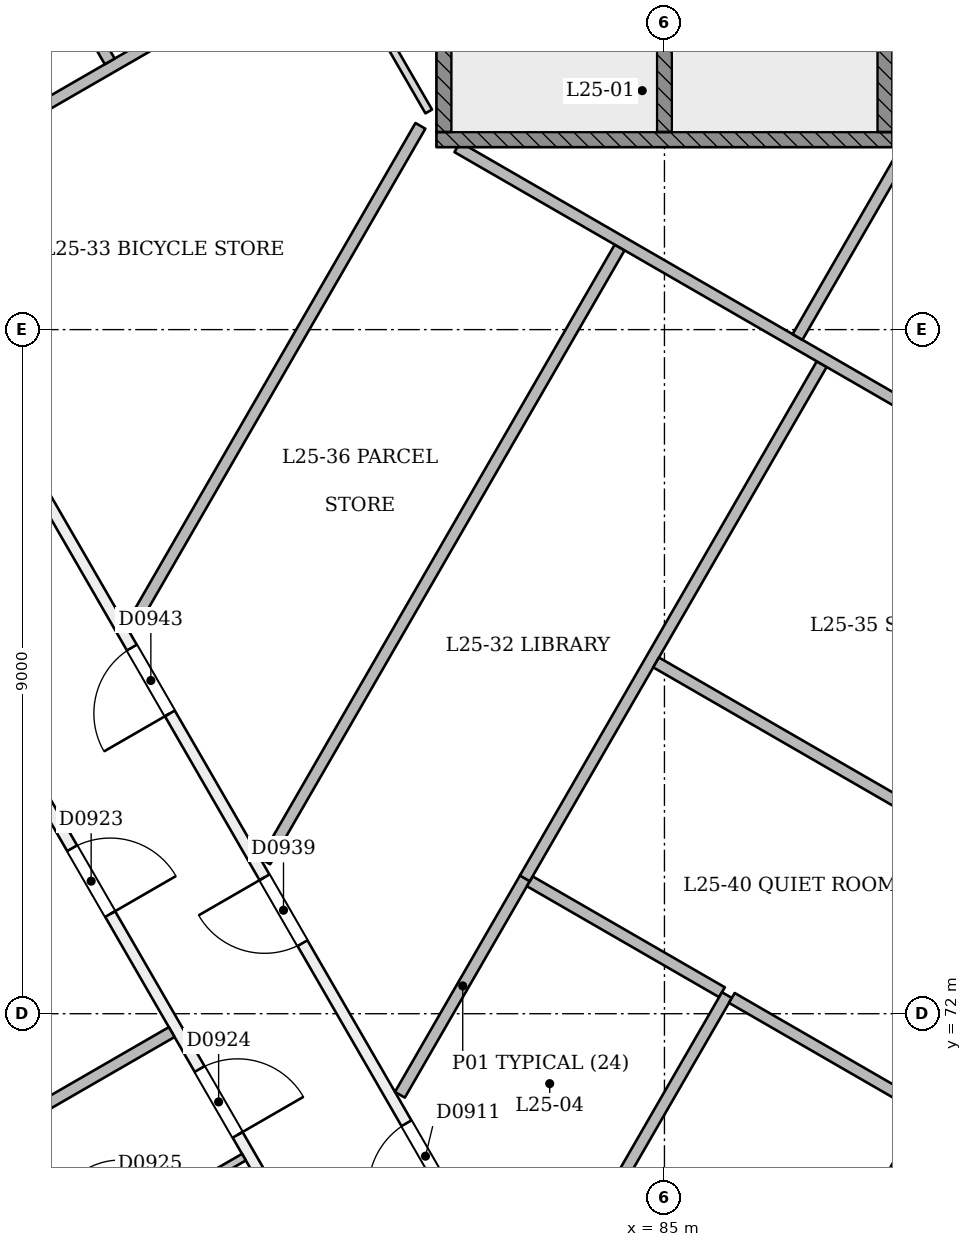
"""IFC4 building model, lengths in metres.
Left out: names, types, materials, properties, quantities, classifications, styles, units other than length and angle.
Written with IfcOpenShell. Run it as: python <this file> out.ifc"""

import sys

from ifc_helpers import new_model, si_unit, direction, frame, frame_2d, origin, place, context, subcontext, project, spatial, rectangle, extrude, element, fill, save


model = new_model("IFC4")
c1 = context("Model", 3, precision=1e-05, world=origin(), true_north=direction((0.0, 1.0)))
c2 = subcontext(c1, "Body", "Model", "MODEL_VIEW")
j1 = project(units=[si_unit("LENGTHUNIT", "METRE"), si_unit("PLANEANGLEUNIT", "RADIAN")], contexts=[c1])
p1 = place(None, origin())
s1 = spatial("IfcSite", under=j1, at=p1, CompositionType="ELEMENT")
p2 = place(p1, origin())
s2 = spatial("IfcBuilding", under=s1, at=p2, CompositionType="ELEMENT")
p3 = place(p2, frame((0.0, 0.0, 100.8)))
s3 = spatial("IfcBuildingStorey", under=s2, at=p3, CompositionType="ELEMENT", Elevation=100.8)
p4 = place(p3, frame((84.935, 64.793, 0.0), z_axis=(0.0, 0.0, 1.0), x_axis=(-0.500000245635, 0.866025261967, 0.0)))
e1 = element("IfcWall", 1, at=p4, inside=s3, PredefinedType="PARTITIONING", context=c2, shape_type="SweptSolid", body=[
    extrude(rectangle(XDim=29.568, YDim=0.15, at=frame_2d((14.784, 0.0))), origin(), (0.0, 0.0, 1.0), 3.1),
])
p5 = place(p4, frame((26.417, 0.0, 0.0)))
e2 = element("IfcOpeningElement", 2, at=p5, cuts=e1, PredefinedType="OPENING", context=c2, shape_type="SweptSolid", body=[
    extrude(rectangle(XDim=0.9, YDim=2.1, at=frame_2d((0.45, 1.05))), frame((0.0, 0.085, 0.0), z_axis=(0.0, -1.0, 0.0), x_axis=(1.0, 0.0, 0.0)), (0.0, 0.0, 1.0), 0.171),
])
p6 = place(p4, frame((5.658, 0.0, 0.0)))
e3 = element("IfcOpeningElement", 3, at=p6, cuts=e1, PredefinedType="OPENING", context=c2, shape_type="SweptSolid", body=[
    extrude(rectangle(XDim=1.0, YDim=2.1, at=frame_2d((0.5, 1.05))), frame((0.0, 0.085, 0.0), z_axis=(0.0, -1.0, 0.0), x_axis=(1.0, 0.0, 0.0)), (0.0, 0.0, 1.0), 0.171),
])
p7 = place(p4, frame((9.394, 0.0, 0.0)))
e4 = element("IfcOpeningElement", 4, at=p7, cuts=e1, PredefinedType="OPENING", context=c2, shape_type="SweptSolid", body=[
    extrude(rectangle(XDim=1.0, YDim=2.1, at=frame_2d((0.5, 1.05))), frame((0.0, 0.085, 0.0), z_axis=(0.0, -1.0, 0.0), x_axis=(1.0, 0.0, 0.0)), (0.0, 0.0, 1.0), 0.171),
])
p8 = place(p4, frame((17.694, 0.0, 0.0)))
e5 = element("IfcOpeningElement", 5, at=p8, cuts=e1, PredefinedType="OPENING", context=c2, shape_type="SweptSolid", body=[
    extrude(rectangle(XDim=1.0, YDim=2.1, at=frame_2d((0.5, 1.05))), frame((0.0, 0.085, 0.0), z_axis=(0.0, -1.0, 0.0), x_axis=(1.0, 0.0, 0.0)), (0.0, 0.0, 1.0), 0.171),
])
p9 = place(p4, frame((12.884, 0.0, 0.0)))
e6 = element("IfcOpeningElement", 6, at=p9, cuts=e1, PredefinedType="OPENING", context=c2, shape_type="SweptSolid", body=[
    extrude(rectangle(XDim=1.0, YDim=2.1, at=frame_2d((0.5, 1.05))), frame((0.0, 0.085, 0.0), z_axis=(0.0, -1.0, 0.0), x_axis=(1.0, 0.0, 0.0)), (0.0, 0.0, 1.0), 0.171),
])
p10 = place(p4, frame((22.366, 0.0, 0.0)))
e7 = element("IfcOpeningElement", 7, at=p10, cuts=e1, PredefinedType="OPENING", context=c2, shape_type="SweptSolid", body=[
    extrude(rectangle(XDim=1.0, YDim=2.1, at=frame_2d((0.5, 1.05))), frame((0.0, 0.085, 0.0), z_axis=(0.0, -1.0, 0.0), x_axis=(1.0, 0.0, 0.0)), (0.0, 0.0, 1.0), 0.171),
])
p11 = place(p3, frame((63.623, 97.706, 0.0), z_axis=(0.0, 0.0, 1.0), x_axis=(0.500000781663, -0.866024952491, 0.0)))
e8 = element("IfcWall", 8, at=p11, inside=s3, PredefinedType="PARTITIONING", context=c2, shape_type="SweptSolid", body=[
    extrude(rectangle(XDim=41.837, YDim=0.15, at=frame_2d((20.919, 0.0))), origin(), (0.0, 0.0, 1.0), 2.7),
])
p12 = place(p11, frame((2.912, 0.0, 0.0)))
e9 = element("IfcOpeningElement", 9, at=p12, cuts=e8, PredefinedType="OPENING", context=c2, shape_type="SweptSolid", body=[
    extrude(rectangle(XDim=1.2, YDim=2.1, at=frame_2d((0.6, 1.05))), frame((0.0, 0.085, 0.0), z_axis=(0.0, -1.0, 0.0), x_axis=(1.0, 0.0, 0.0)), (0.0, 0.0, 1.0), 0.171),
])
p13 = place(p11, frame((10.198, 0.0, 0.0)))
e10 = element("IfcOpeningElement", 10, at=p13, cuts=e8, PredefinedType="OPENING", context=c2, shape_type="SweptSolid", body=[
    extrude(rectangle(XDim=1.0, YDim=2.1, at=frame_2d((0.5, 1.05))), frame((0.0, 0.085, 0.0), z_axis=(0.0, -1.0, 0.0), x_axis=(1.0, 0.0, 0.0)), (0.0, 0.0, 1.0), 0.171),
])
p14 = place(p11, frame((12.523, 0.0, 0.0)))
e11 = element("IfcOpeningElement", 11, at=p14, cuts=e8, PredefinedType="OPENING", context=c2, shape_type="SweptSolid", body=[
    extrude(rectangle(XDim=1.0, YDim=2.1, at=frame_2d((0.5, 1.05))), frame((0.0, 0.085, 0.0), z_axis=(0.0, -1.0, 0.0), x_axis=(1.0, 0.0, 0.0)), (0.0, 0.0, 1.0), 0.171),
])
p15 = place(p11, frame((19.314, 0.0, 0.0)))
e12 = element("IfcOpeningElement", 12, at=p15, cuts=e8, PredefinedType="OPENING", context=c2, shape_type="SweptSolid", body=[
    extrude(rectangle(XDim=1.0, YDim=2.1, at=frame_2d((0.5, 1.05))), frame((0.0, 0.085, 0.0), z_axis=(0.0, -1.0, 0.0), x_axis=(1.0, 0.0, 0.0)), (0.0, 0.0, 1.0), 0.171),
])
p16 = place(p11, frame((21.639, 0.0, 0.0)))
e13 = element("IfcOpeningElement", 13, at=p16, cuts=e8, PredefinedType="OPENING", context=c2, shape_type="SweptSolid", body=[
    extrude(rectangle(XDim=1.0, YDim=2.1, at=frame_2d((0.5, 1.05))), frame((0.0, 0.085, 0.0), z_axis=(0.0, -1.0, 0.0), x_axis=(1.0, 0.0, 0.0)), (0.0, 0.0, 1.0), 0.171),
])
p17 = place(p11, frame((27.169, 0.0, 0.0)))
e14 = element("IfcOpeningElement", 14, at=p17, cuts=e8, PredefinedType="OPENING", context=c2, shape_type="SweptSolid", body=[
    extrude(rectangle(XDim=1.0, YDim=2.1, at=frame_2d((0.5, 1.05))), frame((0.0, 0.085, 0.0), z_axis=(0.0, -1.0, 0.0), x_axis=(1.0, 0.0, 0.0)), (0.0, 0.0, 1.0), 0.171),
])
p18 = place(p11, frame((30.523, 0.0, 0.0)))
e15 = element("IfcOpeningElement", 15, at=p18, cuts=e8, PredefinedType="OPENING", context=c2, shape_type="SweptSolid", body=[
    extrude(rectangle(XDim=1.0, YDim=2.1, at=frame_2d((0.5, 1.05))), frame((0.0, 0.085, 0.0), z_axis=(0.0, -1.0, 0.0), x_axis=(1.0, 0.0, 0.0)), (0.0, 0.0, 1.0), 0.171),
])
p19 = place(p11, frame((37.725, 0.0, 0.0)))
e16 = element("IfcOpeningElement", 16, at=p19, cuts=e8, PredefinedType="OPENING", context=c2, shape_type="SweptSolid", body=[
    extrude(rectangle(XDim=1.2, YDim=2.1, at=frame_2d((0.6, 1.05))), frame((0.0, 0.085, 0.0), z_axis=(0.0, -1.0, 0.0), x_axis=(1.0, 0.0, 0.0)), (0.0, 0.0, 1.0), 0.171),
])
p20 = place(p3, frame((85.458, 61.474, 0.0), z_axis=(0.0, 0.0, 1.0), x_axis=(0.500000781663, 0.866024952491, 0.0)))
e17 = element("IfcWall", 17, at=p20, inside=s3, PredefinedType="PARTITIONING", context=c2, shape_type="SweptSolid", body=[
    extrude(rectangle(XDim=41.837, YDim=0.15, at=frame_2d((20.919, 0.0))), origin(), (0.0, 0.0, 1.0), 2.7),
])
p21 = place(p20, frame((0.253, 0.0, 0.0)))
e18 = element("IfcOpeningElement", 18, at=p21, cuts=e17, PredefinedType="OPENING", context=c2, shape_type="SweptSolid", body=[
    extrude(rectangle(XDim=1.2, YDim=2.1, at=frame_2d((0.6, 1.05))), frame((0.0, 0.085, 0.0), z_axis=(0.0, -1.0, 0.0), x_axis=(1.0, 0.0, 0.0)), (0.0, 0.0, 1.0), 0.171),
])
p22 = place(p20, frame((5.719, 0.0, 0.0)))
e19 = element("IfcOpeningElement", 19, at=p22, cuts=e17, PredefinedType="OPENING", context=c2, shape_type="SweptSolid", body=[
    extrude(rectangle(XDim=1.2, YDim=2.1, at=frame_2d((0.6, 1.05))), frame((0.0, 0.085, 0.0), z_axis=(0.0, -1.0, 0.0), x_axis=(1.0, 0.0, 0.0)), (0.0, 0.0, 1.0), 0.171),
])
p23 = place(p20, frame((13.669, 0.0, 0.0)))
e20 = element("IfcOpeningElement", 20, at=p23, cuts=e17, PredefinedType="OPENING", context=c2, shape_type="SweptSolid", body=[
    extrude(rectangle(XDim=1.0, YDim=2.1, at=frame_2d((0.5, 1.05))), frame((0.0, 0.085, 0.0), z_axis=(0.0, -1.0, 0.0), x_axis=(1.0, 0.0, 0.0)), (0.0, 0.0, 1.0), 0.171),
])
p24 = place(p20, frame((18.169, 0.0, 0.0)))
e21 = element("IfcOpeningElement", 21, at=p24, cuts=e17, PredefinedType="OPENING", context=c2, shape_type="SweptSolid", body=[
    extrude(rectangle(XDim=1.0, YDim=2.1, at=frame_2d((0.5, 1.05))), frame((0.0, 0.085, 0.0), z_axis=(0.0, -1.0, 0.0), x_axis=(1.0, 0.0, 0.0)), (0.0, 0.0, 1.0), 0.171),
])
p25 = place(p20, frame((21.639, 0.0, 0.0)))
e22 = element("IfcOpeningElement", 22, at=p25, cuts=e17, PredefinedType="OPENING", context=c2, shape_type="SweptSolid", body=[
    extrude(rectangle(XDim=1.0, YDim=2.1, at=frame_2d((0.5, 1.05))), frame((0.0, 0.085, 0.0), z_axis=(0.0, -1.0, 0.0), x_axis=(1.0, 0.0, 0.0)), (0.0, 0.0, 1.0), 0.171),
])
p26 = place(p20, frame((27.169, 0.0, 0.0)))
e23 = element("IfcOpeningElement", 23, at=p26, cuts=e17, PredefinedType="OPENING", context=c2, shape_type="SweptSolid", body=[
    extrude(rectangle(XDim=1.0, YDim=2.1, at=frame_2d((0.5, 1.05))), frame((0.0, 0.085, 0.0), z_axis=(0.0, -1.0, 0.0), x_axis=(1.0, 0.0, 0.0)), (0.0, 0.0, 1.0), 0.171),
])
p27 = place(p20, frame((30.639, 0.0, 0.0)))
e24 = element("IfcOpeningElement", 24, at=p27, cuts=e17, PredefinedType="OPENING", context=c2, shape_type="SweptSolid", body=[
    extrude(rectangle(XDim=1.0, YDim=2.1, at=frame_2d((0.5, 1.05))), frame((0.0, 0.085, 0.0), z_axis=(0.0, -1.0, 0.0), x_axis=(1.0, 0.0, 0.0)), (0.0, 0.0, 1.0), 0.171),
])
p28 = place(p20, frame((37.71, 0.0, 0.0)))
e25 = element("IfcOpeningElement", 25, at=p28, cuts=e17, PredefinedType="OPENING", context=c2, shape_type="SweptSolid", body=[
    extrude(rectangle(XDim=1.2, YDim=2.1, at=frame_2d((0.6, 1.05))), frame((0.0, 0.085, 0.0), z_axis=(0.0, -1.0, 0.0), x_axis=(1.0, 0.0, 0.0)), (0.0, 0.0, 1.0), 0.171),
])
p29 = place(p3, frame((99.849, 90.4, 0.0), z_axis=(0.0, 0.0, 1.0), x_axis=(-0.499999267484, -0.866025826702, 0.0)))
e26 = element("IfcWall", 26, at=p29, inside=s3, PredefinedType="PARTITIONING", context=c2, shape_type="SweptSolid", body=[
    extrude(rectangle(XDim=29.698, YDim=0.15, at=frame_2d((14.849, 0.0))), origin(), (0.0, 0.0, 1.0), 3.1),
])
p30 = place(p29, frame((2.178, 0.0, 0.0)))
e27 = element("IfcOpeningElement", 27, at=p30, cuts=e26, PredefinedType="OPENING", context=c2, shape_type="SweptSolid", body=[
    extrude(rectangle(XDim=1.0, YDim=2.1, at=frame_2d((0.5, 1.05))), frame((0.0, 0.085, 0.0), z_axis=(0.0, -1.0, 0.0), x_axis=(1.0, 0.0, 0.0)), (0.0, 0.0, 1.0), 0.171),
])
p31 = place(p29, frame((5.577, 0.0, 0.0)))
e28 = element("IfcOpeningElement", 28, at=p31, cuts=e26, PredefinedType="OPENING", context=c2, shape_type="SweptSolid", body=[
    extrude(rectangle(XDim=1.2, YDim=2.1, at=frame_2d((0.6, 1.05))), frame((0.0, 0.085, 0.0), z_axis=(0.0, -1.0, 0.0), x_axis=(1.0, 0.0, 0.0)), (0.0, 0.0, 1.0), 0.171),
])
p32 = place(p29, frame((16.531, 0.0, 0.0)))
e29 = element("IfcOpeningElement", 29, at=p32, cuts=e26, PredefinedType="OPENING", context=c2, shape_type="SweptSolid", body=[
    extrude(rectangle(XDim=1.2, YDim=2.1, at=frame_2d((0.6, 1.05))), frame((0.0, 0.085, 0.0), z_axis=(0.0, -1.0, 0.0), x_axis=(1.0, 0.0, 0.0)), (0.0, 0.0, 1.0), 0.171),
])
p33 = place(p29, frame((9.491, 0.0, 0.0)))
e30 = element("IfcOpeningElement", 30, at=p33, cuts=e26, PredefinedType="OPENING", context=c2, shape_type="SweptSolid", body=[
    extrude(rectangle(XDim=1.0, YDim=2.1, at=frame_2d((0.5, 1.05))), frame((0.0, 0.085, 0.0), z_axis=(0.0, -1.0, 0.0), x_axis=(1.0, 0.0, 0.0)), (0.0, 0.0, 1.0), 0.171),
])
p34 = place(p29, frame((12.75, 0.0, 0.0)))
e31 = element("IfcOpeningElement", 31, at=p34, cuts=e26, PredefinedType="OPENING", context=c2, shape_type="SweptSolid", body=[
    extrude(rectangle(XDim=1.0, YDim=2.1, at=frame_2d((0.5, 1.05))), frame((0.0, 0.085, 0.0), z_axis=(0.0, -1.0, 0.0), x_axis=(1.0, 0.0, 0.0)), (0.0, 0.0, 1.0), 0.171),
])
p35 = place(p29, frame((20.574, 0.0, 0.0)))
e32 = element("IfcOpeningElement", 32, at=p35, cuts=e26, PredefinedType="OPENING", context=c2, shape_type="SweptSolid", body=[
    extrude(rectangle(XDim=1.0, YDim=2.1, at=frame_2d((0.5, 1.05))), frame((0.0, 0.085, 0.0), z_axis=(0.0, -1.0, 0.0), x_axis=(1.0, 0.0, 0.0)), (0.0, 0.0, 1.0), 0.171),
])
p36 = place(p29, frame((25.296, 0.0, 0.0)))
e33 = element("IfcOpeningElement", 33, at=p36, cuts=e26, PredefinedType="OPENING", context=c2, shape_type="SweptSolid", body=[
    extrude(rectangle(XDim=1.0, YDim=2.1, at=frame_2d((0.5, 1.05))), frame((0.0, 0.085, 0.0), z_axis=(0.0, -1.0, 0.0), x_axis=(1.0, 0.0, 0.0)), (0.0, 0.0, 1.0), 0.171),
])
p37 = place(p3, frame((78.187, 90.3, 0.0), z_axis=(0.0, 0.0, 1.0), x_axis=(0.499983376661, -0.866035001061, 0.0)))
e34 = element("IfcWall", 34, at=p37, inside=s3, PredefinedType="PARTITIONING", context=c2, shape_type="SweptSolid", body=[
    extrude(rectangle(XDim=7.425, YDim=0.1, at=frame_2d((3.712, 0.0))), origin(), (0.0, 0.0, 1.0), 3.1),
])
p38 = place(p3, frame((83.173, 73.797, 0.0), z_axis=(0.0, 0.0, 1.0), x_axis=(-0.499982354831, -0.866035590988, 0.0)))
e35 = element("IfcWall", 35, at=p38, inside=s3, PredefinedType="PARTITIONING", context=c2, shape_type="SweptSolid", body=[
    extrude(rectangle(XDim=3.307, YDim=0.15, at=frame_2d((1.653, 0.0))), origin(), (0.0, 0.0, 1.0), 3.1),
])
p39 = place(p3, frame((85.757, 72.282, 0.0), z_axis=(0.0, 0.0, 1.0), x_axis=(-0.866032430508, 0.49998782916, 0.0)))
e36 = element("IfcWall", 36, at=p39, inside=s3, PredefinedType="PARTITIONING", context=c2, shape_type="SweptSolid", body=[
    extrude(rectangle(XDim=2.92, YDim=0.15, at=frame_2d((1.46, 0.0))), origin(), (0.0, 0.0, 1.0), 3.1),
])
p40 = place(p3, frame((83.292, 67.864, 0.0), z_axis=(0.0, 0.0, 1.0), x_axis=(0.49999536978, 0.866028077027, 0.0)))
e37 = element("IfcWall", 37, at=p40, inside=s3, PredefinedType="PARTITIONING", context=c2, shape_type="SweptSolid", body=[
    extrude(rectangle(XDim=5.059, YDim=0.15, at=frame_2d((2.53, 0.0))), origin(), (0.0, 0.0, 1.0), 3.1),
])
p41 = place(p3, frame((73.022, 68.586, 0.0), z_axis=(0.0, 0.0, 1.0), x_axis=(0.866025401434, 0.500000004071, 0.0)))
e38 = element("IfcWall", 38, at=p41, inside=s3, PredefinedType="PARTITIONING", context=c2, shape_type="SweptSolid", body=[
    extrude(rectangle(XDim=6.345, YDim=0.15, at=frame_2d((3.173, 0.0))), origin(), (0.0, 0.0, 1.0), 2.6),
])
p42 = place(p3, frame((76.934, 68.651, 0.0), z_axis=(0.0, 0.0, 1.0), x_axis=(0.866046596414, 0.499963291492, 0.0)))
e39 = element("IfcWall", 39, at=p42, inside=s3, PredefinedType="PARTITIONING", context=c2, shape_type="SweptSolid", body=[
    extrude(rectangle(XDim=2.925, YDim=0.1, at=frame_2d((1.462, 0.0))), origin(), (0.0, 0.0, 1.0), 3.1),
])
p43 = place(p42, frame((1.05, 0.0, 0.0)))
e40 = element("IfcOpeningElement", 40, at=p43, cuts=e39, PredefinedType="OPENING", context=c2, shape_type="SweptSolid", body=[
    extrude(rectangle(XDim=0.9, YDim=2.1, at=frame_2d((0.45, 1.05))), frame((0.0, 0.061, 0.0), z_axis=(0.0, -1.0, 0.0), x_axis=(1.0, 0.0, 0.0)), (0.0, 0.0, 1.0), 0.121),
])
p44 = place(p3, frame((83.163, 73.78, 0.0), z_axis=(0.0, 0.0, 1.0), x_axis=(0.500011000363, 0.866019052629, 0.0)))
e41 = element("IfcWall", 41, at=p44, inside=s3, PredefinedType="PARTITIONING", context=c2, shape_type="SweptSolid", body=[
    extrude(rectangle(XDim=7.812, YDim=0.15, at=frame_2d((3.906, 0.0))), origin(), (0.0, 0.0, 1.0), 3.1),
])
p45 = place(p3, frame((84.41, 82.081, 0.0), z_axis=(0.0, 0.0, 1.0), x_axis=(-0.500010229568, -0.86601949766, 0.0)))
e42 = element("IfcWall", 42, at=p45, inside=s3, PredefinedType="PARTITIONING", context=c2, shape_type="SweptSolid", body=[
    extrude(rectangle(XDim=9.326, YDim=0.15, at=frame_2d((4.663, 0.0))), origin(), (0.0, 0.0, 1.0), 3.1),
])
p46 = place(p3, frame((77.975, 77.073, 0.0), z_axis=(0.0, 0.0, 1.0), x_axis=(0.499993928037, 0.866028909405, 0.0)))
e43 = element("IfcWall", 43, at=p46, inside=s3, PredefinedType="PARTITIONING", context=c2, shape_type="SweptSolid", body=[
    extrude(rectangle(XDim=7.629, YDim=0.15, at=frame_2d((3.814, 0.0))), origin(), (0.0, 0.0, 1.0), 3.1),
])
p47 = place(p3, frame((80.559, 86.091, 0.0), z_axis=(0.0, 0.0, 1.0), x_axis=(-0.866024378873, -0.500001775195, 0.0)))
e44 = element("IfcWall", 44, at=p47, inside=s3, PredefinedType="PARTITIONING", context=c2, shape_type="SweptSolid", body=[
    extrude(rectangle(XDim=6.784, YDim=0.15, at=frame_2d((3.392, 0.0))), origin(), (0.0, 0.0, 1.0), 3.1),
])
p48 = place(p3, frame((92.36, 77.578, 0.0), z_axis=(0.0, 0.0, 1.0), x_axis=(-0.866025678131, 0.499999524817, 0.0)))
e45 = element("IfcWall", 45, at=p48, inside=s3, PredefinedType="PARTITIONING", context=c2, shape_type="SweptSolid", body=[
    extrude(rectangle(XDim=11.645, YDim=0.15, at=frame_2d((5.822, 0.0))), origin(), (0.0, 0.0, 1.0), 3.1),
])
p49 = place(p3, frame((84.89, 76.622, 0.0), z_axis=(0.0, 0.0, 1.0), x_axis=(0.866030178321, -0.499991730169, 0.0)))
e46 = element("IfcWall", 46, at=p49, inside=s3, PredefinedType="PARTITIONING", context=c2, shape_type="SweptSolid", body=[
    extrude(rectangle(XDim=5.991, YDim=0.15, at=frame_2d((2.995, 0.0))), origin(), (0.0, 0.0, 1.0), 3.1),
])
p50 = place(p3, frame((86.75, 80.903, 0.0), z_axis=(0.0, 0.0, 1.0), x_axis=(0.500002302069, 0.86602407468, 0.0)))
e47 = element("IfcWall", 47, at=p50, inside=s3, PredefinedType="PARTITIONING", context=c2, shape_type="SweptSolid", body=[
    extrude(rectangle(XDim=6.369, YDim=0.15, at=frame_2d((3.184, 0.0))), origin(), (0.0, 0.0, 1.0), 3.1),
])
p51 = place(p3, frame((85.886, 72.208, 0.0), z_axis=(0.0, 0.0, 1.0), x_axis=(0.866022730501, -0.500004630234, 0.0)))
e48 = element("IfcWall", 48, at=p51, inside=s3, PredefinedType="PARTITIONING", context=c2, shape_type="SweptSolid", body=[
    extrude(rectangle(XDim=2.921, YDim=0.15, at=frame_2d((1.46, 0.0))), origin(), (0.0, 0.0, 1.0), 3.1),
])
p52 = place(p3, frame((75.506, 88.332, 0.0), z_axis=(0.0, 0.0, 1.0), x_axis=(0.50001918445, -0.866014327354, 0.0)))
e49 = element("IfcWall", 49, at=p52, inside=s3, PredefinedType="PARTITIONING", context=c2, shape_type="SweptSolid", body=[
    extrude(rectangle(XDim=4.392, YDim=0.15, at=frame_2d((2.196, 0.0))), origin(), (0.0, 0.0, 1.0), 3.1),
])
p53 = place(p3, frame((82.0, 83.5, 0.0), z_axis=(0.0, 0.0, 1.0), x_axis=(1.0, 0.0, 0.0)))
e50 = element("IfcWall", 50, at=p53, inside=s3, PredefinedType="SOLIDWALL", context=c2, shape_type="SweptSolid", body=[
    extrude(rectangle(XDim=6.0, YDim=0.2, at=frame_2d((3.0, 0.0))), origin(), (0.0, 0.0, 1.0), 3.1),
])
for number, where, z_axis, x_axis in (
    (51, (82.1, 83.6, 0.0), (0.0, 0.0, 1.0), (0.0, 1.0, 0.0)),
    (52, (87.9, 83.6, 0.0), (0.0, 0.0, 1.0), (0.0, 1.0, 0.0)),
    (53, (85.0, 83.6, 0.0), (0.0, 0.0, 1.0), (0.0, 1.0, 0.0)),
):
    element("IfcWall", number, at=place(p3, frame(where, z_axis=z_axis, x_axis=x_axis)), inside=s3, PredefinedType="SOLIDWALL", context=c2, shape_type="SweptSolid", body=[
        extrude(rectangle(XDim=6.8, YDim=0.2, at=frame_2d((3.4, 0.0))), origin(), (0.0, 0.0, 1.0), 3.1),
    ])
p54 = place(p6, origin())
e54 = element("IfcDoor", 54, at=p54, inside=s3, OperationType="SINGLE_SWING_LEFT", PredefinedType="NOTDEFINED", context=c2, shape_type="SweptSolid", body=[
    extrude(rectangle(XDim=1.0, YDim=2.1, at=frame_2d((0.5, 1.05))), frame((0.0, 0.025, 0.0), z_axis=(0.0, -1.0, 0.0), x_axis=(1.0, 0.0, 0.0)), (0.0, 0.0, 1.0), 0.05),
])
fill(e3, e54)
p55 = place(p17, origin())
e55 = element("IfcDoor", 55, at=p55, inside=s3, OperationType="SINGLE_SWING_RIGHT", PredefinedType="NOTDEFINED", context=c2, shape_type="SweptSolid", body=[
    extrude(rectangle(XDim=1.0, YDim=2.1, at=frame_2d((0.5, 1.05))), frame((0.0, 0.025, 0.0), z_axis=(0.0, -1.0, 0.0), x_axis=(1.0, 0.0, 0.0)), (0.0, 0.0, 1.0), 0.05),
])
fill(e14, e55)
p56 = place(p18, origin())
e56 = element("IfcDoor", 56, at=p56, inside=s3, OperationType="SINGLE_SWING_RIGHT", PredefinedType="NOTDEFINED", context=c2, shape_type="SweptSolid", body=[
    extrude(rectangle(XDim=1.0, YDim=2.1, at=frame_2d((0.5, 1.05))), frame((0.0, 0.025, 0.0), z_axis=(0.0, -1.0, 0.0), x_axis=(1.0, 0.0, 0.0)), (0.0, 0.0, 1.0), 0.05),
])
fill(e15, e56)
p57 = place(p7, origin())
e57 = element("IfcDoor", 57, at=p57, inside=s3, OperationType="SINGLE_SWING_RIGHT", PredefinedType="NOTDEFINED", context=c2, shape_type="SweptSolid", body=[
    extrude(rectangle(XDim=1.0, YDim=2.1, at=frame_2d((0.5, 1.05))), frame((0.0, 0.025, 0.0), z_axis=(0.0, -1.0, 0.0), x_axis=(1.0, 0.0, 0.0)), (0.0, 0.0, 1.0), 0.05),
])
fill(e4, e57)
p58 = place(p9, origin())
e58 = element("IfcDoor", 58, at=p58, inside=s3, OperationType="SINGLE_SWING_LEFT", PredefinedType="NOTDEFINED", context=c2, shape_type="SweptSolid", body=[
    extrude(rectangle(XDim=1.0, YDim=2.1, at=frame_2d((0.5, 1.05))), frame((0.0, 0.025, 0.0), z_axis=(0.0, -1.0, 0.0), x_axis=(1.0, 0.0, 0.0)), (0.0, 0.0, 1.0), 0.05),
])
fill(e6, e58)
save(model, sys.argv[1])
